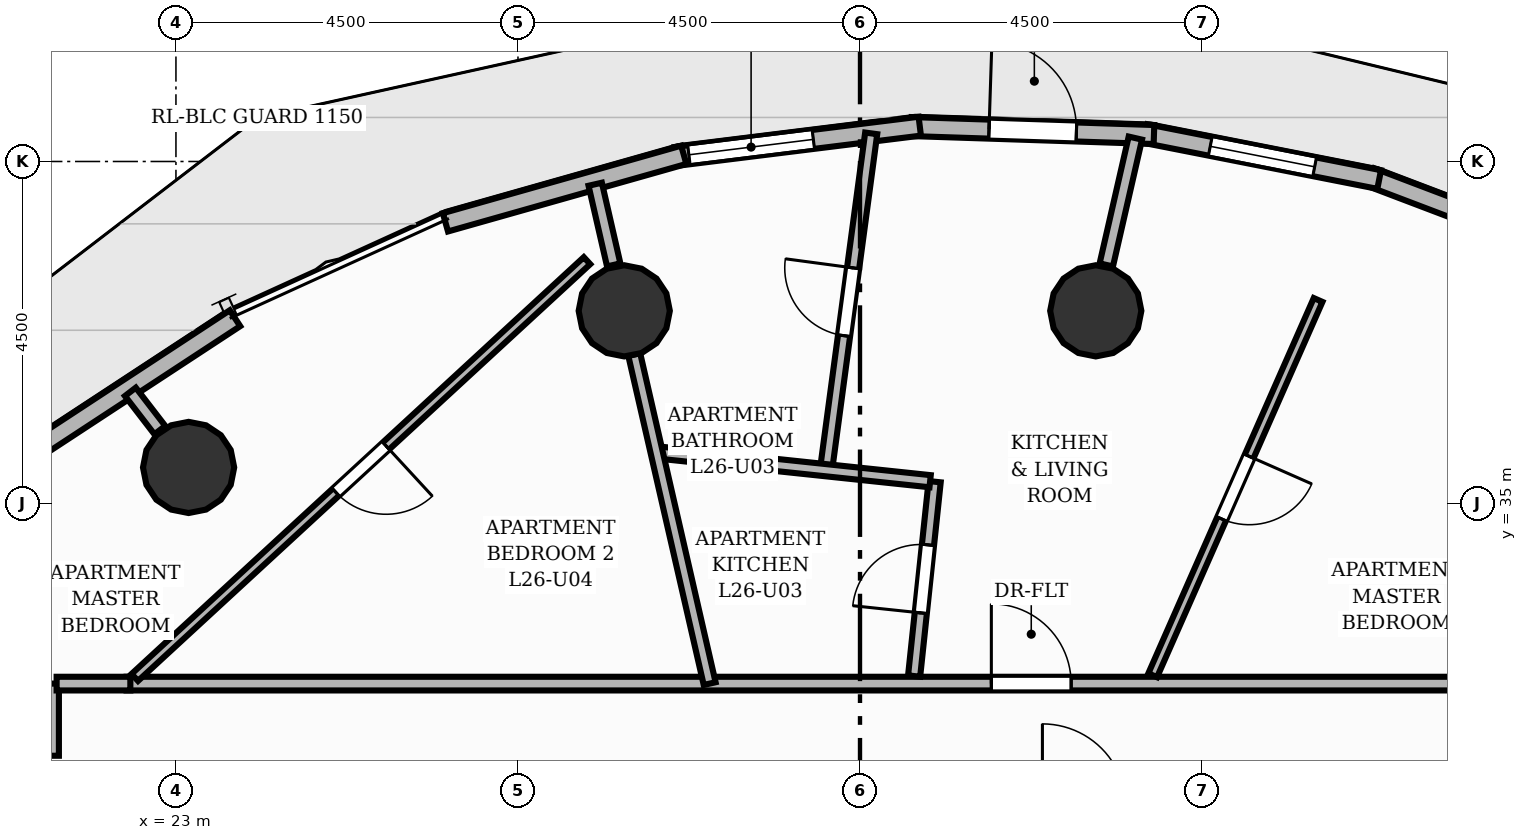
"""IFC4 building model, lengths in metres.
Left out: names, types, materials, properties, quantities, classifications, styles, units other than length and angle.
Written with IfcOpenShell. Run it as: python <this file> out.ifc"""

import sys

from ifc_helpers import new_model, si_unit, direction, frame, frame_2d, origin, origin_2d, place, context, subcontext, project, spatial, rectangle, circle, extrude, element, fill, save


model = new_model("IFC4")
c1 = context("Model", 3, precision=1e-05, world=origin(), true_north=direction((0.0, 1.0)))
c2 = subcontext(c1, "Body", "Model", "MODEL_VIEW")
j1 = project(units=[si_unit("LENGTHUNIT", "METRE"), si_unit("PLANEANGLEUNIT", "RADIAN")], contexts=[c1])
p1 = place(None, origin())
s1 = spatial("IfcSite", under=j1, at=p1, CompositionType="ELEMENT")
p2 = place(p1, origin())
s2 = spatial("IfcBuilding", under=s1, at=p2, CompositionType="ELEMENT")
p3 = place(p2, frame((0.0, 0.0, 90.08)))
s3 = spatial("IfcBuildingStorey", under=s2, at=p3, CompositionType="ELEMENT", Elevation=90.08)
for number, where, z_axis, x_axis in (
    (1, (35.102, 37.535, 0.0), (0.0, 0.0, 1.0), (1.0, 0.0, 0.0)),
    (2, (28.898, 37.535, 0.0), (0.0, 0.0, 1.0), (1.0, 0.0, 0.0)),
    (3, (23.167, 35.474, 0.0), (0.0, 0.0, 1.0), (1.0, 0.0, 0.0)),
):
    element("IfcColumn", number, at=place(p3, frame(where, z_axis=z_axis, x_axis=x_axis)), inside=s3, PredefinedType="COLUMN", context=c2, shape_type="SweptSolid", body=[
        extrude(circle(Radius=0.6, at=origin_2d()), origin(), (0.0, 0.0, 1.0), 3.2),
    ])
p4 = place(p3, frame((38.724, 39.293, 0.0), z_axis=(0.0, 0.0, 1.0), x_axis=(0.934815891493, -0.355132720277, 0.0)))
e4 = element("IfcWall", 4, at=p4, inside=s3, PredefinedType="SOLIDWALL", context=c2, shape_type="SweptSolid", body=[
    extrude(rectangle(XDim=3.061, YDim=0.25, at=frame_2d((1.53, 0.0))), origin(), (0.0, 0.0, 1.0), 2.96),
])
p5 = place(p3, frame((35.758, 39.867, 0.0), z_axis=(0.0, 0.0, 1.0), x_axis=(0.981187677549, -0.193056316721, 0.0)))
e5 = element("IfcWall", 5, at=p5, inside=s3, PredefinedType="SOLIDWALL", context=c2, shape_type="SweptSolid", body=[
    extrude(rectangle(XDim=3.131, YDim=0.25, at=frame_2d((1.565, 0.0))), origin(), (0.0, 0.0, 1.0), 2.96),
])
p6 = place(p5, frame((0.866, 0.0, 0.85)))
e6 = element("IfcOpeningElement", 6, at=p6, cuts=e5, PredefinedType="OPENING", context=c2, shape_type="SweptSolid", body=[
    extrude(rectangle(XDim=1.4, YDim=1.55, at=frame_2d((0.7, 0.775))), frame((0.0, 0.135, 0.0), z_axis=(0.0, -1.0, 0.0), x_axis=(1.0, 0.0, 0.0)), (0.0, 0.0, 1.0), 0.27),
])
p7 = place(p3, frame((32.677, 39.959, 0.0), z_axis=(0.0, 0.0, 1.0), x_axis=(0.999464092211, -0.032734208101, 0.0)))
e7 = element("IfcWall", 7, at=p7, inside=s3, PredefinedType="SOLIDWALL", context=c2, shape_type="SweptSolid", body=[
    extrude(rectangle(XDim=3.192, YDim=0.25, at=frame_2d((1.596, 0.0))), origin(), (0.0, 0.0, 1.0), 2.96),
])
p8 = place(p7, frame((1.021, 0.0, 0.0)))
e8 = element("IfcOpeningElement", 8, at=p8, cuts=e7, PredefinedType="OPENING", context=c2, shape_type="SweptSolid", body=[
    extrude(rectangle(XDim=1.15, YDim=2.2, at=frame_2d((0.575, 1.1))), frame((0.0, 0.135, 0.0), z_axis=(0.0, -1.0, 0.0), x_axis=(1.0, 0.0, 0.0)), (0.0, 0.0, 1.0), 0.27),
])
p9 = place(p3, frame((29.575, 39.566, 0.0), z_axis=(0.0, 0.0, 1.0), x_axis=(0.99241077266, 0.122966899235, 0.0)))
e9 = element("IfcWall", 9, at=p9, inside=s3, PredefinedType="SOLIDWALL", context=c2, shape_type="SweptSolid", body=[
    extrude(rectangle(XDim=3.236, YDim=0.25, at=frame_2d((1.618, 0.0))), origin(), (0.0, 0.0, 1.0), 2.96),
])
p10 = place(p9, frame((0.175, 0.0, 0.85)))
e10 = element("IfcOpeningElement", 10, at=p10, cuts=e9, PredefinedType="OPENING", context=c2, shape_type="SweptSolid", body=[
    extrude(rectangle(XDim=1.65, YDim=1.55, at=frame_2d((0.825, 0.775))), frame((0.0, 0.135, 0.0), z_axis=(0.0, -1.0, 0.0), x_axis=(1.0, 0.0, 0.0)), (0.0, 0.0, 1.0), 0.27),
])
p11 = place(p3, frame((26.545, 38.699, 0.0), z_axis=(0.0, 0.0, 1.0), x_axis=(0.962134911526, 0.272573681825, 0.0)))
e11 = element("IfcWall", 11, at=p11, inside=s3, PredefinedType="SOLIDWALL", context=c2, shape_type="SweptSolid", body=[
    extrude(rectangle(XDim=3.26, YDim=0.25, at=frame_2d((1.63, 0.0))), origin(), (0.0, 0.0, 1.0), 2.96),
])
p12 = place(p3, frame((21.071, 35.663, 0.0), z_axis=(0.0, 0.0, 1.0), x_axis=(0.836273856728, 0.548311988336, 0.0)))
e12 = element("IfcWall", 12, at=p12, inside=s3, PredefinedType="SOLIDWALL", context=c2, shape_type="SweptSolid", body=[
    extrude(rectangle(XDim=3.236, YDim=0.25, at=frame_2d((1.618, 0.0))), origin(), (0.0, 0.0, 1.0), 2.96),
])
p13 = place(p3, frame((35.24, 38.139, 0.0), z_axis=(0.0, 0.0, 1.0), x_axis=(0.223359217097, 0.974736200281, 0.0)))
e13 = element("IfcWall", 13, at=p13, inside=s3, PredefinedType="PARTITIONING", context=c2, shape_type="SweptSolid", body=[
    extrude(rectangle(XDim=1.712, YDim=0.18, at=frame_2d((0.856, 0.0))), origin(), (0.0, 0.0, 1.0), 2.26),
])
p14 = place(p3, frame((28.76, 38.139, 0.0), z_axis=(0.0, 0.0, 1.0), x_axis=(-0.223287406217, 0.974752652843, 0.0)))
e14 = element("IfcWall", 14, at=p14, inside=s3, PredefinedType="PARTITIONING", context=c2, shape_type="SweptSolid", body=[
    extrude(rectangle(XDim=1.089, YDim=0.18, at=frame_2d((0.544, 0.0))), origin(), (0.0, 0.0, 1.0), 2.26),
])
p15 = place(p3, frame((22.788, 35.966, 0.0), z_axis=(0.0, 0.0, 1.0), x_axis=(-0.609970610867, 0.792424036661, 0.0)))
e15 = element("IfcWall", 15, at=p15, inside=s3, PredefinedType="PARTITIONING", context=c2, shape_type="SweptSolid", body=[
    extrude(rectangle(XDim=0.635, YDim=0.18, at=frame_2d((0.318, 0.0))), origin(), (0.0, 0.0, 1.0), 2.26),
])
p16 = place(p3, frame((22.351, 32.63, 0.0), z_axis=(0.0, 0.0, 1.0), x_axis=(1.0, 0.0, 0.0)))
e16 = element("IfcWall", 16, at=p16, inside=s3, PredefinedType="PARTITIONING", context=c2, shape_type="SweptSolid", body=[
    extrude(rectangle(XDim=20.279, YDim=0.18, at=frame_2d((10.14, 0.0))), origin(), (0.0, 0.0, 1.0), 2.955),
])
p17 = place(p16, frame((11.378, 0.0, 0.0)))
e17 = element("IfcOpeningElement", 17, at=p17, cuts=e16, PredefinedType="OPENING", context=c2, shape_type="SweptSolid", body=[
    extrude(rectangle(XDim=1.05, YDim=2.15, at=frame_2d((0.525, 1.075))), frame((0.0, 0.1, 0.0), z_axis=(0.0, -1.0, 0.0), x_axis=(1.0, 0.0, 0.0)), (0.0, 0.0, 1.0), 0.2),
])
p18 = place(p3, frame((21.37, 31.681, 0.0), z_axis=(0.0, 0.0, 1.0), x_axis=(0.0, 1.0, 0.0)))
e18 = element("IfcWall", 18, at=p18, inside=s3, PredefinedType="PARTITIONING", context=c2, shape_type="SweptSolid", body=[
    extrude(rectangle(XDim=0.949, YDim=0.18, at=frame_2d((0.475, 0.0))), origin(), (0.0, 0.0, 1.0), 2.955),
])
p19 = place(p3, frame((21.43, 32.63, 0.0), z_axis=(0.0, 0.0, 1.0), x_axis=(1.0, 0.0, 0.0)))
e19 = element("IfcWall", 19, at=p19, inside=s3, PredefinedType="PARTITIONING", context=c2, shape_type="SweptSolid", body=[
    extrude(rectangle(XDim=0.97, YDim=0.18, at=frame_2d((0.485, 0.0))), origin(), (0.0, 0.0, 1.0), 2.955),
])
p20 = place(p3, frame((31.552, 35.438, 0.0), z_axis=(0.0, 0.0, 1.0), x_axis=(0.132986130607, 0.991117898671, 0.0)))
e20 = element("IfcWall", 20, at=p20, inside=s3, PredefinedType="PLUMBINGWALL", context=c2, shape_type="SweptSolid", body=[
    extrude(rectangle(XDim=4.472, YDim=0.16, at=frame_2d((2.236, 0.0))), origin(), (0.0, 0.0, 1.0), 2.955),
])
p21 = place(p20, frame((1.786, 0.0, 0.0)))
e21 = element("IfcOpeningElement", 21, at=p21, cuts=e20, PredefinedType="OPENING", context=c2, shape_type="SweptSolid", body=[
    extrude(rectangle(XDim=0.9, YDim=2.1, at=frame_2d((0.45, 1.05))), frame((0.0, 0.09, 0.0), z_axis=(0.0, -1.0, 0.0), x_axis=(1.0, 0.0, 0.0)), (0.0, 0.0, 1.0), 0.18),
])
p22 = place(p3, frame((38.027, 37.678, 0.0), z_axis=(0.0, 0.0, 1.0), x_axis=(-0.403235845427, -0.91509608947, 0.0)))
e22 = element("IfcWall", 22, at=p22, inside=s3, PredefinedType="PARTITIONING", context=c2, shape_type="SweptSolid", body=[
    extrude(rectangle(XDim=5.396, YDim=0.125, at=frame_2d((2.698, 0.0))), origin(), (0.0, 0.0, 1.0), 2.955),
])
p23 = place(p22, frame((2.248, 0.0, 0.0)))
e23 = element("IfcOpeningElement", 23, at=p23, cuts=e22, PredefinedType="OPENING", context=c2, shape_type="SweptSolid", body=[
    extrude(rectangle(XDim=0.9, YDim=2.1, at=frame_2d((0.45, 1.05))), frame((0.0, 0.073, 0.0), z_axis=(0.0, -1.0, 0.0), x_axis=(1.0, 0.0, 0.0)), (0.0, 0.0, 1.0), 0.145),
])
p24 = place(p3, frame((32.712, 32.729, 0.0), z_axis=(0.0, 0.0, 1.0), x_axis=(0.105094954285, 0.994462191631, 0.0)))
e24 = element("IfcWall", 24, at=p24, inside=s3, PredefinedType="PLUMBINGWALL", context=c2, shape_type="SweptSolid", body=[
    extrude(rectangle(XDim=2.572, YDim=0.16, at=frame_2d((1.286, 0.0))), origin(), (0.0, 0.0, 1.0), 2.641),
])
p25 = place(p24, frame((0.836, 0.0, 0.0)))
e25 = element("IfcOpeningElement", 25, at=p25, cuts=e24, PredefinedType="OPENING", context=c2, shape_type="SweptSolid", body=[
    extrude(rectangle(XDim=0.9, YDim=2.1, at=frame_2d((0.45, 1.05))), frame((0.0, 0.09, 0.0), z_axis=(0.0, -1.0, 0.0), x_axis=(1.0, 0.0, 0.0)), (0.0, 0.0, 1.0), 0.18),
])
p26 = place(p3, frame((32.923, 35.293, 0.0), z_axis=(0.0, 0.0, 1.0), x_axis=(-0.994472124215, 0.105000924563, 0.0)))
e26 = element("IfcWall", 26, at=p26, inside=s3, PredefinedType="PLUMBINGWALL", context=c2, shape_type="SweptSolid", body=[
    extrude(rectangle(XDim=3.618, YDim=0.16, at=frame_2d((1.809, 0.0))), origin(), (0.0, 0.0, 1.0), 2.955),
])
p27 = place(p3, frame((30.022, 32.63, 0.0), z_axis=(0.0, 0.0, 1.0), x_axis=(-0.223321757884, 0.974744783241, 0.0)))
e27 = element("IfcWall", 27, at=p27, inside=s3, PredefinedType="PLUMBINGWALL", context=c2, shape_type="SweptSolid", body=[
    extrude(rectangle(XDim=4.442, YDim=0.16, at=frame_2d((2.221, 0.0))), origin(), (0.0, 0.0, 1.0), 2.26),
])
p28 = place(p3, frame((28.408, 38.195, 0.0), z_axis=(0.0, 0.0, 1.0), x_axis=(-0.735306461181, -0.677734762386, 0.0)))
e28 = element("IfcWall", 28, at=p28, inside=s3, PredefinedType="PARTITIONING", context=c2, shape_type="SweptSolid", body=[
    extrude(rectangle(XDim=8.091, YDim=0.125, at=frame_2d((4.045, 0.0))), origin(), (0.0, 0.0, 1.0), 2.403),
])
p29 = place(p28, frame((3.596, 0.0, 0.0)))
e29 = element("IfcOpeningElement", 29, at=p29, cuts=e28, PredefinedType="OPENING", context=c2, shape_type="SweptSolid", body=[
    extrude(rectangle(XDim=0.9, YDim=2.1, at=frame_2d((0.45, 1.05))), frame((0.0, 0.073, 0.0), z_axis=(0.0, -1.0, 0.0), x_axis=(1.0, 0.0, 0.0)), (0.0, 0.0, 1.0), 0.145),
])
p30 = place(p8, origin())
e30 = element("IfcDoor", 30, at=p30, inside=s3, OperationType="SINGLE_SWING_LEFT", PredefinedType="DOOR", context=c2, shape_type="SweptSolid", body=[
    extrude(rectangle(XDim=1.15, YDim=2.2, at=frame_2d((0.575, 1.1))), frame((0.0, 0.025, 0.0), z_axis=(0.0, -1.0, 0.0), x_axis=(1.0, 0.0, 0.0)), (0.0, 0.0, 1.0), 0.05),
])
fill(e8, e30)
p31 = place(p6, origin())
e31 = element("IfcWindow", 31, at=p31, inside=s3, PartitioningType="SINGLE_PANEL", PredefinedType="WINDOW", context=c2, shape_type="SweptSolid", body=[
    extrude(rectangle(XDim=1.4, YDim=1.55, at=frame_2d((0.7, 0.775))), frame((0.0, 0.03, 0.0), z_axis=(0.0, -1.0, 0.0), x_axis=(1.0, 0.0, 0.0)), (0.0, 0.0, 1.0), 0.06),
])
fill(e6, e31)
p32 = place(p10, origin())
e32 = element("IfcWindow", 32, at=p32, inside=s3, PartitioningType="SINGLE_PANEL", PredefinedType="WINDOW", context=c2, shape_type="SweptSolid", body=[
    extrude(rectangle(XDim=1.65, YDim=1.55, at=frame_2d((0.825, 0.775))), frame((0.0, 0.03, 0.0), z_axis=(0.0, -1.0, 0.0), x_axis=(1.0, 0.0, 0.0)), (0.0, 0.0, 1.0), 0.06),
])
fill(e10, e32)
p33 = place(p17, origin())
e33 = element("IfcDoor", 33, at=p33, inside=s3, OperationType="SINGLE_SWING_LEFT", PredefinedType="DOOR", context=c2, shape_type="SweptSolid", body=[
    extrude(rectangle(XDim=1.05, YDim=2.15, at=frame_2d((0.525, 1.075))), frame((0.0, 0.025, 0.0), z_axis=(0.0, -1.0, 0.0), x_axis=(1.0, 0.0, 0.0)), (0.0, 0.0, 1.0), 0.05),
])
fill(e17, e33)
p34 = place(p21, origin())
e34 = element("IfcDoor", 34, at=p34, inside=s3, OperationType="SINGLE_SWING_RIGHT", PredefinedType="DOOR", context=c2, shape_type="SweptSolid", body=[
    extrude(rectangle(XDim=0.9, YDim=2.1, at=frame_2d((0.45, 1.05))), frame((0.0, 0.025, 0.0), z_axis=(0.0, -1.0, 0.0), x_axis=(1.0, 0.0, 0.0)), (0.0, 0.0, 1.0), 0.05),
])
fill(e21, e34)
p35 = place(p23, origin())
e35 = element("IfcDoor", 35, at=p35, inside=s3, OperationType="SINGLE_SWING_LEFT", PredefinedType="DOOR", context=c2, shape_type="SweptSolid", body=[
    extrude(rectangle(XDim=0.9, YDim=2.1, at=frame_2d((0.45, 1.05))), frame((0.0, 0.025, 0.0), z_axis=(0.0, -1.0, 0.0), x_axis=(1.0, 0.0, 0.0)), (0.0, 0.0, 1.0), 0.05),
])
fill(e23, e35)
p36 = place(p25, origin())
e36 = element("IfcDoor", 36, at=p36, inside=s3, OperationType="SINGLE_SWING_LEFT", PredefinedType="DOOR", context=c2, shape_type="SweptSolid", body=[
    extrude(rectangle(XDim=0.9, YDim=2.1, at=frame_2d((0.45, 1.05))), frame((0.0, 0.025, 0.0), z_axis=(0.0, -1.0, 0.0), x_axis=(1.0, 0.0, 0.0)), (0.0, 0.0, 1.0), 0.05),
])
fill(e25, e36)
p37 = place(p29, origin())
e37 = element("IfcDoor", 37, at=p37, inside=s3, OperationType="SINGLE_SWING_LEFT", PredefinedType="DOOR", context=c2, shape_type="SweptSolid", body=[
    extrude(rectangle(XDim=0.9, YDim=2.1, at=frame_2d((0.45, 1.05))), frame((0.0, 0.025, 0.0), z_axis=(0.0, -1.0, 0.0), x_axis=(1.0, 0.0, 0.0)), (0.0, 0.0, 1.0), 0.05),
])
fill(e29, e37)
save(model, sys.argv[1])
